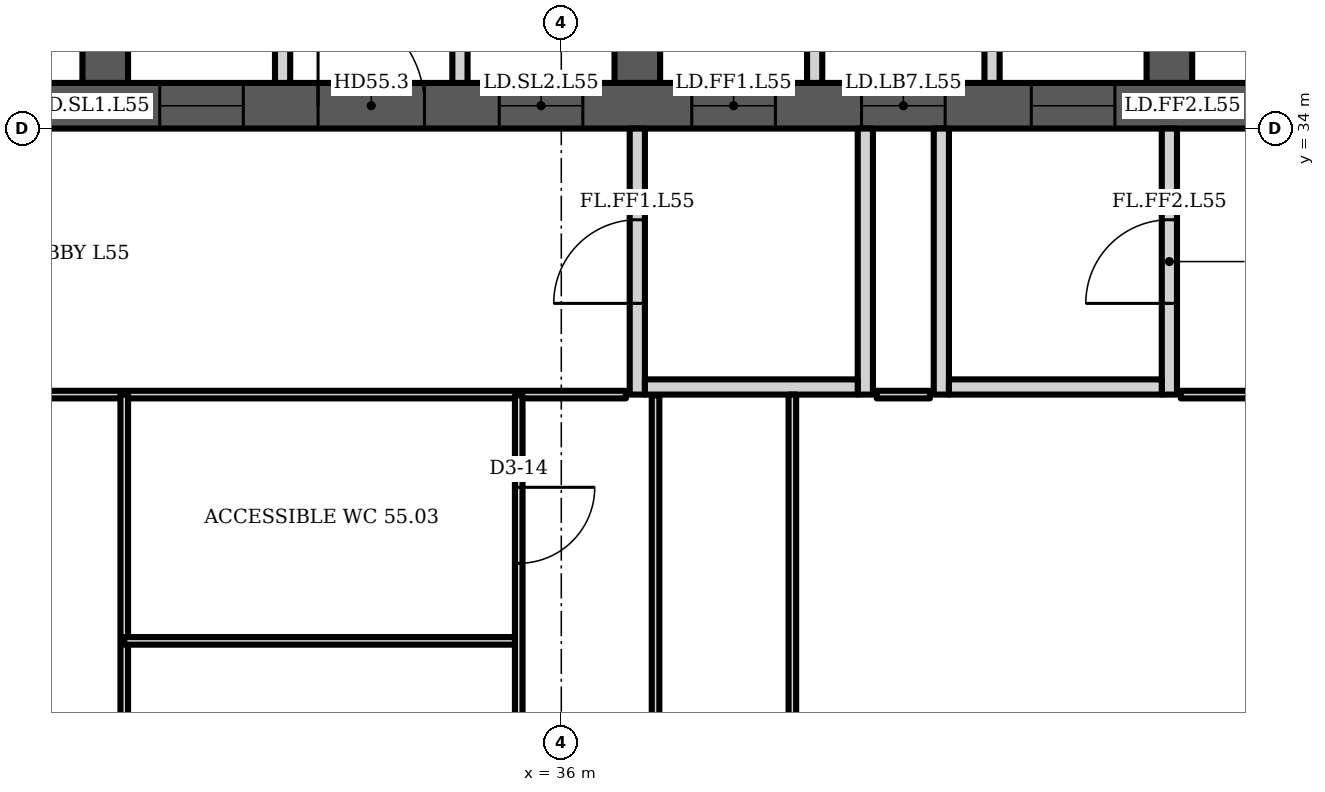
"""IFC4 building model, lengths in metres.
Left out: names, types, materials, properties, quantities, classifications, styles, units other than length and angle.
Written with IfcOpenShell. Run it as: python <this file> out.ifc"""

import sys

from ifc_helpers import new_model, si_unit, direction, frame, frame_2d, origin, place, context, subcontext, project, spatial, polyline, rectangle, outline, extrude, element, fill, save


model = new_model("IFC4")
c1 = context("Model", 3, precision=1e-05, world=origin(), true_north=direction((0.0, 1.0)))
c2 = subcontext(c1, "Body", "Model", "MODEL_VIEW")
j1 = project(units=[si_unit("LENGTHUNIT", "METRE"), si_unit("PLANEANGLEUNIT", "RADIAN")], contexts=[c1])
p1 = place(None, origin())
s1 = spatial("IfcSite", under=j1, at=p1, CompositionType="ELEMENT")
p2 = place(p1, origin())
s2 = spatial("IfcBuilding", under=s1, at=p2, CompositionType="ELEMENT")
p3 = place(p2, frame((0.0, 0.0, 221.5)))
s3 = spatial("IfcBuildingStorey", under=s2, at=p3, CompositionType="ELEMENT", Elevation=221.5)
p4 = place(p3, frame((23.0, 34.3, 0.0), z_axis=(0.0, 0.0, 1.0), x_axis=(1.0, 0.0, 0.0)))
e1 = element("IfcWall", 1, at=p4, inside=s3, PredefinedType="SHEAR", context=c2, shape_type="SweptSolid", body=[
    extrude(rectangle(XDim=35.0, YDim=0.6, at=frame_2d((17.5, 0.0))), origin(), (0.0, 0.0, 1.0), 3.6),
])
p5 = place(p4, frame((0.65, 0.0, 0.0)))
e2 = element("IfcOpeningElement", 2, at=p5, cuts=e1, PredefinedType="OPENING", context=c2, shape_type="SweptSolid", body=[
    extrude(rectangle(XDim=1.2, YDim=2.1, at=frame_2d((0.6, 1.05))), frame((0.0, 0.31, 0.0), z_axis=(0.0, -1.0, 0.0), x_axis=(1.0, 0.0, 0.0)), (0.0, 0.0, 1.0), 0.62),
])
p6 = place(p4, frame((7.717, 0.0, 0.0)))
e3 = element("IfcOpeningElement", 3, at=p6, cuts=e1, PredefinedType="OPENING", context=c2, shape_type="SweptSolid", body=[
    extrude(rectangle(XDim=1.1, YDim=2.1, at=frame_2d((0.55, 1.05))), frame((0.0, 0.31, 0.0), z_axis=(0.0, -1.0, 0.0), x_axis=(1.0, 0.0, 0.0)), (0.0, 0.0, 1.0), 0.62),
])
p7 = place(p4, frame((12.183, 0.0, 0.0)))
e4 = element("IfcOpeningElement", 4, at=p7, cuts=e1, PredefinedType="OPENING", context=c2, shape_type="SweptSolid", body=[
    extrude(rectangle(XDim=1.1, YDim=2.1, at=frame_2d((0.55, 1.05))), frame((0.0, 0.31, 0.0), z_axis=(0.0, -1.0, 0.0), x_axis=(1.0, 0.0, 0.0)), (0.0, 0.0, 1.0), 0.62),
])
p8 = place(p4, frame((9.8, 0.0, 0.0)))
e5 = element("IfcOpeningElement", 5, at=p8, cuts=e1, PredefinedType="OPENING", context=c2, shape_type="SweptSolid", body=[
    extrude(rectangle(XDim=1.4, YDim=2.1, at=frame_2d((0.7, 1.05))), frame((0.0, 0.31, 0.0), z_axis=(0.0, -1.0, 0.0), x_axis=(1.0, 0.0, 0.0)), (0.0, 0.0, 1.0), 0.62),
])
p9 = place(p4, frame((14.717, 0.0, 0.0)))
e6 = element("IfcOpeningElement", 6, at=p9, cuts=e1, PredefinedType="OPENING", context=c2, shape_type="SweptSolid", body=[
    extrude(rectangle(XDim=1.1, YDim=2.1, at=frame_2d((0.55, 1.05))), frame((0.0, 0.31, 0.0), z_axis=(0.0, -1.0, 0.0), x_axis=(1.0, 0.0, 0.0)), (0.0, 0.0, 1.0), 0.62),
])
p10 = place(p4, frame((16.95, 0.0, 0.0)))
e7 = element("IfcOpeningElement", 7, at=p10, cuts=e1, PredefinedType="OPENING", context=c2, shape_type="SweptSolid", body=[
    extrude(rectangle(XDim=1.1, YDim=2.1, at=frame_2d((0.55, 1.05))), frame((0.0, 0.31, 0.0), z_axis=(0.0, -1.0, 0.0), x_axis=(1.0, 0.0, 0.0)), (0.0, 0.0, 1.0), 0.62),
])
p11 = place(p4, frame((19.183, 0.0, 0.0)))
e8 = element("IfcOpeningElement", 8, at=p11, cuts=e1, PredefinedType="OPENING", context=c2, shape_type="SweptSolid", body=[
    extrude(rectangle(XDim=1.1, YDim=2.1, at=frame_2d((0.55, 1.05))), frame((0.0, 0.31, 0.0), z_axis=(0.0, -1.0, 0.0), x_axis=(1.0, 0.0, 0.0)), (0.0, 0.0, 1.0), 0.62),
])
p12 = place(p4, frame((26.15, 0.0, 0.0)))
e9 = element("IfcOpeningElement", 9, at=p12, cuts=e1, PredefinedType="OPENING", context=c2, shape_type="SweptSolid", body=[
    extrude(rectangle(XDim=1.2, YDim=2.1, at=frame_2d((0.6, 1.05))), frame((0.0, 0.31, 0.0), z_axis=(0.0, -1.0, 0.0), x_axis=(1.0, 0.0, 0.0)), (0.0, 0.0, 1.0), 0.62),
])
p13 = place(p4, frame((28.767, 0.0, 0.0)))
e10 = element("IfcOpeningElement", 10, at=p13, cuts=e1, PredefinedType="OPENING", context=c2, shape_type="SweptSolid", body=[
    extrude(rectangle(XDim=1.0, YDim=2.1, at=frame_2d((0.5, 1.05))), frame((0.0, 0.31, 0.0), z_axis=(0.0, -1.0, 0.0), x_axis=(1.0, 0.0, 0.0)), (0.0, 0.0, 1.0), 0.62),
])
p14 = place(p4, frame((33.083, 0.0, 0.0)))
e11 = element("IfcOpeningElement", 11, at=p14, cuts=e1, PredefinedType="OPENING", context=c2, shape_type="SweptSolid", body=[
    extrude(rectangle(XDim=1.0, YDim=2.1, at=frame_2d((0.5, 1.05))), frame((0.0, 0.31, 0.0), z_axis=(0.0, -1.0, 0.0), x_axis=(1.0, 0.0, 0.0)), (0.0, 0.0, 1.0), 0.62),
])
p15 = place(p4, frame((30.8, 0.0, 0.0)))
e12 = element("IfcOpeningElement", 12, at=p15, cuts=e1, PredefinedType="OPENING", context=c2, shape_type="SweptSolid", body=[
    extrude(rectangle(XDim=1.4, YDim=2.1, at=frame_2d((0.7, 1.05))), frame((0.0, 0.31, 0.0), z_axis=(0.0, -1.0, 0.0), x_axis=(1.0, 0.0, 0.0)), (0.0, 0.0, 1.0), 0.62),
])
p16 = place(p3, frame((30.0, 34.6, 0.0), z_axis=(0.0, 0.0, 1.0), x_axis=(0.0, 1.0, 0.0)))
e13 = element("IfcWall", 13, at=p16, inside=s3, PredefinedType="SHEAR", context=c2, shape_type="SweptSolid", body=[
    extrude(rectangle(XDim=14.171, YDim=0.6, at=frame_2d((7.085, 0.0))), origin(), (0.0, 0.0, 1.0), 3.6),
])
p17 = place(p16, frame((3.8, 0.0, 0.0)))
e14 = element("IfcOpeningElement", 14, at=p17, cuts=e13, PredefinedType="OPENING", context=c2, shape_type="SweptSolid", body=[
    extrude(rectangle(XDim=1.1, YDim=2.1, at=frame_2d((0.55, 1.05))), frame((0.0, 0.31, 0.0), z_axis=(0.0, -1.0, 0.0), x_axis=(1.0, 0.0, 0.0)), (0.0, 0.0, 1.0), 0.62),
])
p18 = place(p3, frame((37.0, 34.6, 0.0), z_axis=(0.0, 0.0, 1.0), x_axis=(0.0, 1.0, 0.0)))
e15 = element("IfcWall", 15, at=p18, inside=s3, PredefinedType="SHEAR", context=c2, shape_type="SweptSolid", body=[
    extrude(rectangle(XDim=14.784, YDim=0.6, at=frame_2d((7.392, 0.0))), origin(), (0.0, 0.0, 1.0), 3.6),
])
p19 = place(p18, frame((11.302, 0.0, 0.0)))
e16 = element("IfcOpeningElement", 16, at=p19, cuts=e15, PredefinedType="OPENING", context=c2, shape_type="SweptSolid", body=[
    extrude(rectangle(XDim=1.0, YDim=2.1, at=frame_2d((0.5, 1.05))), frame((0.0, 0.31, 0.0), z_axis=(0.0, -1.0, 0.0), x_axis=(1.0, 0.0, 0.0)), (0.0, 0.0, 1.0), 0.62),
])
p20 = place(p18, frame((3.8, 0.0, 0.0)))
e17 = element("IfcOpeningElement", 17, at=p20, cuts=e15, PredefinedType="OPENING", context=c2, shape_type="SweptSolid", body=[
    extrude(rectangle(XDim=1.1, YDim=2.1, at=frame_2d((0.55, 1.05))), frame((0.0, 0.31, 0.0), z_axis=(0.0, -1.0, 0.0), x_axis=(1.0, 0.0, 0.0)), (0.0, 0.0, 1.0), 0.62),
])
p21 = place(p3, frame((44.0, 34.6, 0.0), z_axis=(0.0, 0.0, 1.0), x_axis=(0.0, 1.0, 0.0)))
e18 = element("IfcWall", 18, at=p21, inside=s3, PredefinedType="SHEAR", context=c2, shape_type="SweptSolid", body=[
    extrude(rectangle(XDim=14.784, YDim=0.6, at=frame_2d((7.392, 0.0))), origin(), (0.0, 0.0, 1.0), 3.6),
])
p22 = place(p21, frame((11.608, 0.0, 0.0)))
e19 = element("IfcOpeningElement", 19, at=p22, cuts=e18, PredefinedType="OPENING", context=c2, shape_type="SweptSolid", body=[
    extrude(rectangle(XDim=1.0, YDim=2.1, at=frame_2d((0.5, 1.05))), frame((0.0, 0.31, 0.0), z_axis=(0.0, -1.0, 0.0), x_axis=(1.0, 0.0, 0.0)), (0.0, 0.0, 1.0), 0.62),
])
p23 = place(p21, frame((3.8, 0.0, 0.0)))
e20 = element("IfcOpeningElement", 20, at=p23, cuts=e18, PredefinedType="OPENING", context=c2, shape_type="SweptSolid", body=[
    extrude(rectangle(XDim=1.1, YDim=2.1, at=frame_2d((0.55, 1.05))), frame((0.0, 0.31, 0.0), z_axis=(0.0, -1.0, 0.0), x_axis=(1.0, 0.0, 0.0)), (0.0, 0.0, 1.0), 0.62),
])
p24 = place(p3, frame((0.0, 0.0, -0.0)))
e21 = element("IfcWall", 21, at=p24, inside=s3, PredefinedType="PARTITIONING", context=c2, shape_type="SweptSolid", body=[
    extrude(outline(polyline([(32.233, 37.45), (30.3, 37.45), (30.3, 37.65), (32.233, 37.65), (32.433, 37.65), (32.433, 34.6), (32.233, 34.6), (32.233, 37.45)])), origin(), (0.0, 0.0, 1.0), 3.2),
])
p25 = place(p3, frame((0.0, 0.0, -0.0)))
e22 = element("IfcWall", 22, at=p25, inside=s3, PredefinedType="PARTITIONING", context=c2, shape_type="SweptSolid", body=[
    extrude(outline(polyline([(34.567, 37.65), (34.767, 37.65), (36.7, 37.65), (36.7, 37.45), (34.767, 37.45), (34.767, 34.6), (34.567, 34.6), (34.567, 37.65)])), origin(), (0.0, 0.0, 1.0), 3.2),
])
p26 = place(p3, frame((0.0, 0.0, -0.0)))
e23 = element("IfcWall", 23, at=p26, inside=s3, PredefinedType="PARTITIONING", context=c2, shape_type="SweptSolid", body=[
    extrude(outline(polyline([(41.567, 37.1), (39.433, 37.1), (39.433, 34.6), (39.233, 34.6), (39.233, 37.45), (37.3, 37.45), (37.3, 37.65), (39.233, 37.65), (39.433, 37.65), (39.433, 37.3), (41.567, 37.3), (41.567, 37.35), (41.767, 37.35), (43.7, 37.35), (43.7, 37.15), (41.767, 37.15), (41.767, 34.6), (41.567, 34.6), (41.567, 37.1)])), origin(), (0.0, 0.0, 1.0), 3.2),
])
p27 = place(p3, frame((37.0, 30.5, 0.0), z_axis=(0.0, 0.0, 1.0), x_axis=(0.0, 1.0, 0.0)))
e24 = element("IfcWall", 24, at=p27, inside=s3, PredefinedType="PARTITIONING", context=c2, shape_type="SweptSolid", body=[
    extrude(rectangle(XDim=3.5, YDim=0.2, at=frame_2d((1.75, 0.0))), origin(), (0.0, 0.0, 1.0), 3.2),
])
p28 = place(p27, frame((1.2, 0.0, 0.0)))
e25 = element("IfcOpeningElement", 25, at=p28, cuts=e24, PredefinedType="OPENING", context=c2, shape_type="SweptSolid", body=[
    extrude(rectangle(XDim=1.1, YDim=2.1, at=frame_2d((0.55, 1.05))), frame((0.0, 0.11, 0.0), z_axis=(0.0, -1.0, 0.0), x_axis=(1.0, 0.0, 0.0)), (0.0, 0.0, 1.0), 0.22),
])
p29 = place(p3, frame((40.0, 30.5, 0.0), z_axis=(0.0, 0.0, 1.0), x_axis=(0.0, 1.0, 0.0)))
e26 = element("IfcWall", 26, at=p29, inside=s3, PredefinedType="PARTITIONING", context=c2, shape_type="SweptSolid", body=[
    extrude(rectangle(XDim=3.5, YDim=0.2, at=frame_2d((1.75, 0.0))), origin(), (0.0, 0.0, 1.0), 3.2),
])
p30 = place(p3, frame((37.1, 30.6, 0.0), z_axis=(0.0, 0.0, 1.0), x_axis=(1.0, 0.0, 0.0)))
e27 = element("IfcWall", 27, at=p30, inside=s3, PredefinedType="PARTITIONING", context=c2, shape_type="SweptSolid", body=[
    extrude(rectangle(XDim=2.8, YDim=0.2, at=frame_2d((1.4, 0.0))), origin(), (0.0, 0.0, 1.0), 3.2),
])
p31 = place(p3, frame((41.0, 30.5, 0.0), z_axis=(0.0, 0.0, 1.0), x_axis=(0.0, 1.0, 0.0)))
e28 = element("IfcWall", 28, at=p31, inside=s3, PredefinedType="PARTITIONING", context=c2, shape_type="SweptSolid", body=[
    extrude(rectangle(XDim=3.5, YDim=0.2, at=frame_2d((1.75, 0.0))), origin(), (0.0, 0.0, 1.0), 3.2),
])
p32 = place(p3, frame((44.0, 30.5, 0.0), z_axis=(0.0, 0.0, 1.0), x_axis=(0.0, 1.0, 0.0)))
e29 = element("IfcWall", 29, at=p32, inside=s3, PredefinedType="PARTITIONING", context=c2, shape_type="SweptSolid", body=[
    extrude(rectangle(XDim=3.5, YDim=0.2, at=frame_2d((1.75, 0.0))), origin(), (0.0, 0.0, 1.0), 3.2),
])
p33 = place(p32, frame((1.2, 0.0, 0.0)))
e30 = element("IfcOpeningElement", 30, at=p33, cuts=e29, PredefinedType="OPENING", context=c2, shape_type="SweptSolid", body=[
    extrude(rectangle(XDim=1.1, YDim=2.1, at=frame_2d((0.55, 1.05))), frame((0.0, 0.11, 0.0), z_axis=(0.0, -1.0, 0.0), x_axis=(1.0, 0.0, 0.0)), (0.0, 0.0, 1.0), 0.22),
])
p34 = place(p3, frame((41.1, 30.6, 0.0), z_axis=(0.0, 0.0, 1.0), x_axis=(1.0, 0.0, 0.0)))
e31 = element("IfcWall", 31, at=p34, inside=s3, PredefinedType="PARTITIONING", context=c2, shape_type="SweptSolid", body=[
    extrude(rectangle(XDim=2.8, YDim=0.2, at=frame_2d((1.4, 0.0))), origin(), (0.0, 0.0, 1.0), 3.2),
])
p35 = place(p3, frame((24.8, 30.5, 0.0), z_axis=(0.0, 0.0, 1.0), x_axis=(1.0, 0.0, 0.0)))
e32 = element("IfcWall", 32, at=p35, inside=s3, PredefinedType="PARTITIONING", context=c2, shape_type="SweptSolid", body=[
    extrude(rectangle(XDim=12.05, YDim=0.1, at=frame_2d((6.025, 0.0))), origin(), (0.0, 0.0, 1.0), 3.2),
])
p36 = place(p3, frame((30.25, 17.0, 0.0), z_axis=(0.0, 0.0, 1.0), x_axis=(0.0, 1.0, 0.0)))
e33 = element("IfcWall", 33, at=p36, inside=s3, PredefinedType="PARTITIONING", context=c2, shape_type="SweptSolid", body=[
    extrude(rectangle(XDim=13.5, YDim=0.1, at=frame_2d((6.75, 0.0))), origin(), (0.0, 0.0, 1.0), 3.2),
])
p37 = place(p3, frame((30.25, 27.26, 0.0), z_axis=(0.0, 0.0, 1.0), x_axis=(1.0, 0.0, 0.0)))
e34 = element("IfcWall", 34, at=p37, inside=s3, PredefinedType="PARTITIONING", context=c2, shape_type="SweptSolid", body=[
    extrude(rectangle(XDim=5.19, YDim=0.1, at=frame_2d((2.595, 0.0))), origin(), (0.0, 0.0, 1.0), 3.2),
])
p38 = place(p3, frame((35.44, 16.995, 0.0), z_axis=(0.0, 0.0, 1.0), x_axis=(0.0, 1.0, 0.0)))
e35 = element("IfcWall", 35, at=p38, inside=s3, PredefinedType="PARTITIONING", context=c2, shape_type="SweptSolid", body=[
    extrude(rectangle(XDim=13.495, YDim=0.1, at=frame_2d((6.748, 0.0))), origin(), (0.0, 0.0, 1.0), 3.2),
])
p39 = place(p38, frame((2.166, 0.0, 0.0)))
e36 = element("IfcOpeningElement", 36, at=p39, cuts=e35, PredefinedType="OPENING", context=c2, shape_type="SweptSolid", body=[
    extrude(rectangle(XDim=0.9, YDim=2.1, at=frame_2d((0.45, 1.05))), frame((0.0, 0.06, 0.0), z_axis=(0.0, -1.0, 0.0), x_axis=(1.0, 0.0, 0.0)), (0.0, 0.0, 1.0), 0.12),
])
p40 = place(p38, frame((7.215, 0.0, 0.0)))
e37 = element("IfcOpeningElement", 37, at=p40, cuts=e35, PredefinedType="OPENING", context=c2, shape_type="SweptSolid", body=[
    extrude(rectangle(XDim=0.9, YDim=2.1, at=frame_2d((0.45, 1.05))), frame((0.0, 0.06, 0.0), z_axis=(0.0, -1.0, 0.0), x_axis=(1.0, 0.0, 0.0)), (0.0, 0.0, 1.0), 0.12),
])
p41 = place(p38, frame((11.285, 0.0, 0.0)))
e38 = element("IfcOpeningElement", 38, at=p41, cuts=e35, PredefinedType="OPENING", context=c2, shape_type="SweptSolid", body=[
    extrude(rectangle(XDim=1.0, YDim=2.1, at=frame_2d((0.5, 1.05))), frame((0.0, 0.06, 0.0), z_axis=(0.0, -1.0, 0.0), x_axis=(1.0, 0.0, 0.0)), (0.0, 0.0, 1.0), 0.12),
])
p42 = place(p3, frame((37.24, 4.587, 0.0), z_axis=(0.0, 0.0, 1.0), x_axis=(0.0, 1.0, 0.0)))
e39 = element("IfcWall", 39, at=p42, inside=s3, PredefinedType="PARTITIONING", context=c2, shape_type="SweptSolid", body=[
    extrude(rectangle(XDim=25.903, YDim=0.1, at=frame_2d((12.952, 0.0))), origin(), (0.0, 0.0, 1.0), 2.58),
])
p43 = place(p42, frame((11.802, 0.0, 0.0)))
e40 = element("IfcOpeningElement", 40, at=p43, cuts=e39, PredefinedType="OPENING", context=c2, shape_type="SweptSolid", body=[
    extrude(rectangle(XDim=1.0, YDim=2.1, at=frame_2d((0.5, 1.05))), frame((0.0, 0.06, 0.0), z_axis=(0.0, -1.0, 0.0), x_axis=(1.0, 0.0, 0.0)), (0.0, 0.0, 1.0), 0.12),
])
p44 = place(p3, frame((39.04, 15.245, 0.0), z_axis=(0.0, 0.0, 1.0), x_axis=(0.0, 1.0, 0.0)))
e41 = element("IfcWall", 41, at=p44, inside=s3, PredefinedType="PARTITIONING", context=c2, shape_type="SweptSolid", body=[
    extrude(rectangle(XDim=15.255, YDim=0.1, at=frame_2d((7.627, 0.0))), origin(), (0.0, 0.0, 1.0), 3.2),
])
p45 = place(p44, frame((3.575, 0.0, 0.0)))
e42 = element("IfcOpeningElement", 42, at=p45, cuts=e41, PredefinedType="OPENING", context=c2, shape_type="SweptSolid", body=[
    extrude(rectangle(XDim=1.0, YDim=2.1, at=frame_2d((0.5, 1.05))), frame((0.0, 0.06, 0.0), z_axis=(0.0, -1.0, 0.0), x_axis=(1.0, 0.0, 0.0)), (0.0, 0.0, 1.0), 0.12),
])
p46 = place(p44, frame((8.075, 0.0, 0.0)))
e43 = element("IfcOpeningElement", 43, at=p46, cuts=e41, PredefinedType="OPENING", context=c2, shape_type="SweptSolid", body=[
    extrude(rectangle(XDim=1.0, YDim=2.1, at=frame_2d((0.5, 1.05))), frame((0.0, 0.06, 0.0), z_axis=(0.0, -1.0, 0.0), x_axis=(1.0, 0.0, 0.0)), (0.0, 0.0, 1.0), 0.12),
])
p47 = place(p3, frame((40.15, 30.5, 0.0), z_axis=(0.0, 0.0, 1.0), x_axis=(1.0, 0.0, 0.0)))
e44 = element("IfcWall", 44, at=p47, inside=s3, PredefinedType="PARTITIONING", context=c2, shape_type="SweptSolid", body=[
    extrude(rectangle(XDim=0.7, YDim=0.1, at=frame_2d((0.35, 0.0))), origin(), (0.0, 0.0, 1.0), 3.2),
])
p48 = place(p3, frame((44.15, 30.5, 0.0), z_axis=(0.0, 0.0, 1.0), x_axis=(1.0, 0.0, 0.0)))
e45 = element("IfcWall", 45, at=p48, inside=s3, PredefinedType="PARTITIONING", context=c2, shape_type="SweptSolid", body=[
    extrude(rectangle(XDim=13.85, YDim=0.1, at=frame_2d((6.925, 0.0))), origin(), (0.0, 0.0, 1.0), 3.2),
])
p49 = place(p48, frame((6.77, 0.0, 0.0)))
e46 = element("IfcOpeningElement", 46, at=p49, cuts=e45, PredefinedType="OPENING", context=c2, shape_type="SweptSolid", body=[
    extrude(rectangle(XDim=1.0, YDim=2.1, at=frame_2d((0.5, 1.05))), frame((0.0, 0.06, 0.0), z_axis=(0.0, -1.0, 0.0), x_axis=(1.0, 0.0, 0.0)), (0.0, 0.0, 1.0), 0.12),
])
p50 = place(p6, origin())
e47 = element("IfcDoor", 47, at=p50, inside=s3, OperationType="DOUBLE_DOOR_SLIDING", PredefinedType="DOOR", context=c2, shape_type="SweptSolid", body=[
    extrude(rectangle(XDim=1.1, YDim=2.1, at=frame_2d((0.55, 1.05))), frame((0.0, 0.025, 0.0), z_axis=(0.0, -1.0, 0.0), x_axis=(1.0, 0.0, 0.0)), (0.0, 0.0, 1.0), 0.05),
])
fill(e3, e47)
p51 = place(p7, origin())
e48 = element("IfcDoor", 48, at=p51, inside=s3, OperationType="DOUBLE_DOOR_SLIDING", PredefinedType="DOOR", context=c2, shape_type="SweptSolid", body=[
    extrude(rectangle(XDim=1.1, YDim=2.1, at=frame_2d((0.55, 1.05))), frame((0.0, 0.025, 0.0), z_axis=(0.0, -1.0, 0.0), x_axis=(1.0, 0.0, 0.0)), (0.0, 0.0, 1.0), 0.05),
])
fill(e4, e48)
p52 = place(p8, origin())
e49 = element("IfcDoor", 49, at=p52, inside=s3, OperationType="DOUBLE_DOOR_SINGLE_SWING", PredefinedType="DOOR", context=c2, shape_type="SweptSolid", body=[
    extrude(rectangle(XDim=1.4, YDim=2.1, at=frame_2d((0.7, 1.05))), frame((0.0, 0.025, 0.0), z_axis=(0.0, -1.0, 0.0), x_axis=(1.0, 0.0, 0.0)), (0.0, 0.0, 1.0), 0.05),
])
fill(e5, e49)
p53 = place(p9, origin())
e50 = element("IfcDoor", 50, at=p53, inside=s3, OperationType="DOUBLE_DOOR_SLIDING", PredefinedType="DOOR", context=c2, shape_type="SweptSolid", body=[
    extrude(rectangle(XDim=1.1, YDim=2.1, at=frame_2d((0.55, 1.05))), frame((0.0, 0.025, 0.0), z_axis=(0.0, -1.0, 0.0), x_axis=(1.0, 0.0, 0.0)), (0.0, 0.0, 1.0), 0.05),
])
fill(e6, e50)
p54 = place(p10, origin())
e51 = element("IfcDoor", 51, at=p54, inside=s3, OperationType="DOUBLE_DOOR_SLIDING", PredefinedType="DOOR", context=c2, shape_type="SweptSolid", body=[
    extrude(rectangle(XDim=1.1, YDim=2.1, at=frame_2d((0.55, 1.05))), frame((0.0, 0.025, 0.0), z_axis=(0.0, -1.0, 0.0), x_axis=(1.0, 0.0, 0.0)), (0.0, 0.0, 1.0), 0.05),
])
fill(e7, e51)
p55 = place(p11, origin())
e52 = element("IfcDoor", 52, at=p55, inside=s3, OperationType="DOUBLE_DOOR_SLIDING", PredefinedType="DOOR", context=c2, shape_type="SweptSolid", body=[
    extrude(rectangle(XDim=1.1, YDim=2.1, at=frame_2d((0.55, 1.05))), frame((0.0, 0.025, 0.0), z_axis=(0.0, -1.0, 0.0), x_axis=(1.0, 0.0, 0.0)), (0.0, 0.0, 1.0), 0.05),
])
fill(e8, e52)
p56 = place(p28, origin())
e53 = element("IfcDoor", 53, at=p56, inside=s3, OperationType="SINGLE_SWING_LEFT", PredefinedType="DOOR", context=c2, shape_type="SweptSolid", body=[
    extrude(rectangle(XDim=1.1, YDim=2.1, at=frame_2d((0.55, 1.05))), frame((0.0, 0.025, 0.0), z_axis=(0.0, -1.0, 0.0), x_axis=(1.0, 0.0, 0.0)), (0.0, 0.0, 1.0), 0.05),
])
fill(e25, e53)
p57 = place(p33, origin())
e54 = element("IfcDoor", 54, at=p57, inside=s3, OperationType="SINGLE_SWING_LEFT", PredefinedType="DOOR", context=c2, shape_type="SweptSolid", body=[
    extrude(rectangle(XDim=1.1, YDim=2.1, at=frame_2d((0.55, 1.05))), frame((0.0, 0.025, 0.0), z_axis=(0.0, -1.0, 0.0), x_axis=(1.0, 0.0, 0.0)), (0.0, 0.0, 1.0), 0.05),
])
fill(e30, e54)
p58 = place(p41, origin())
e55 = element("IfcDoor", 55, at=p58, inside=s3, OperationType="SINGLE_SWING_RIGHT", PredefinedType="DOOR", context=c2, shape_type="SweptSolid", body=[
    extrude(rectangle(XDim=1.0, YDim=2.1, at=frame_2d((0.5, 1.05))), frame((0.0, 0.025, 0.0), z_axis=(0.0, -1.0, 0.0), x_axis=(1.0, 0.0, 0.0)), (0.0, 0.0, 1.0), 0.05),
])
fill(e38, e55)
save(model, sys.argv[1])
